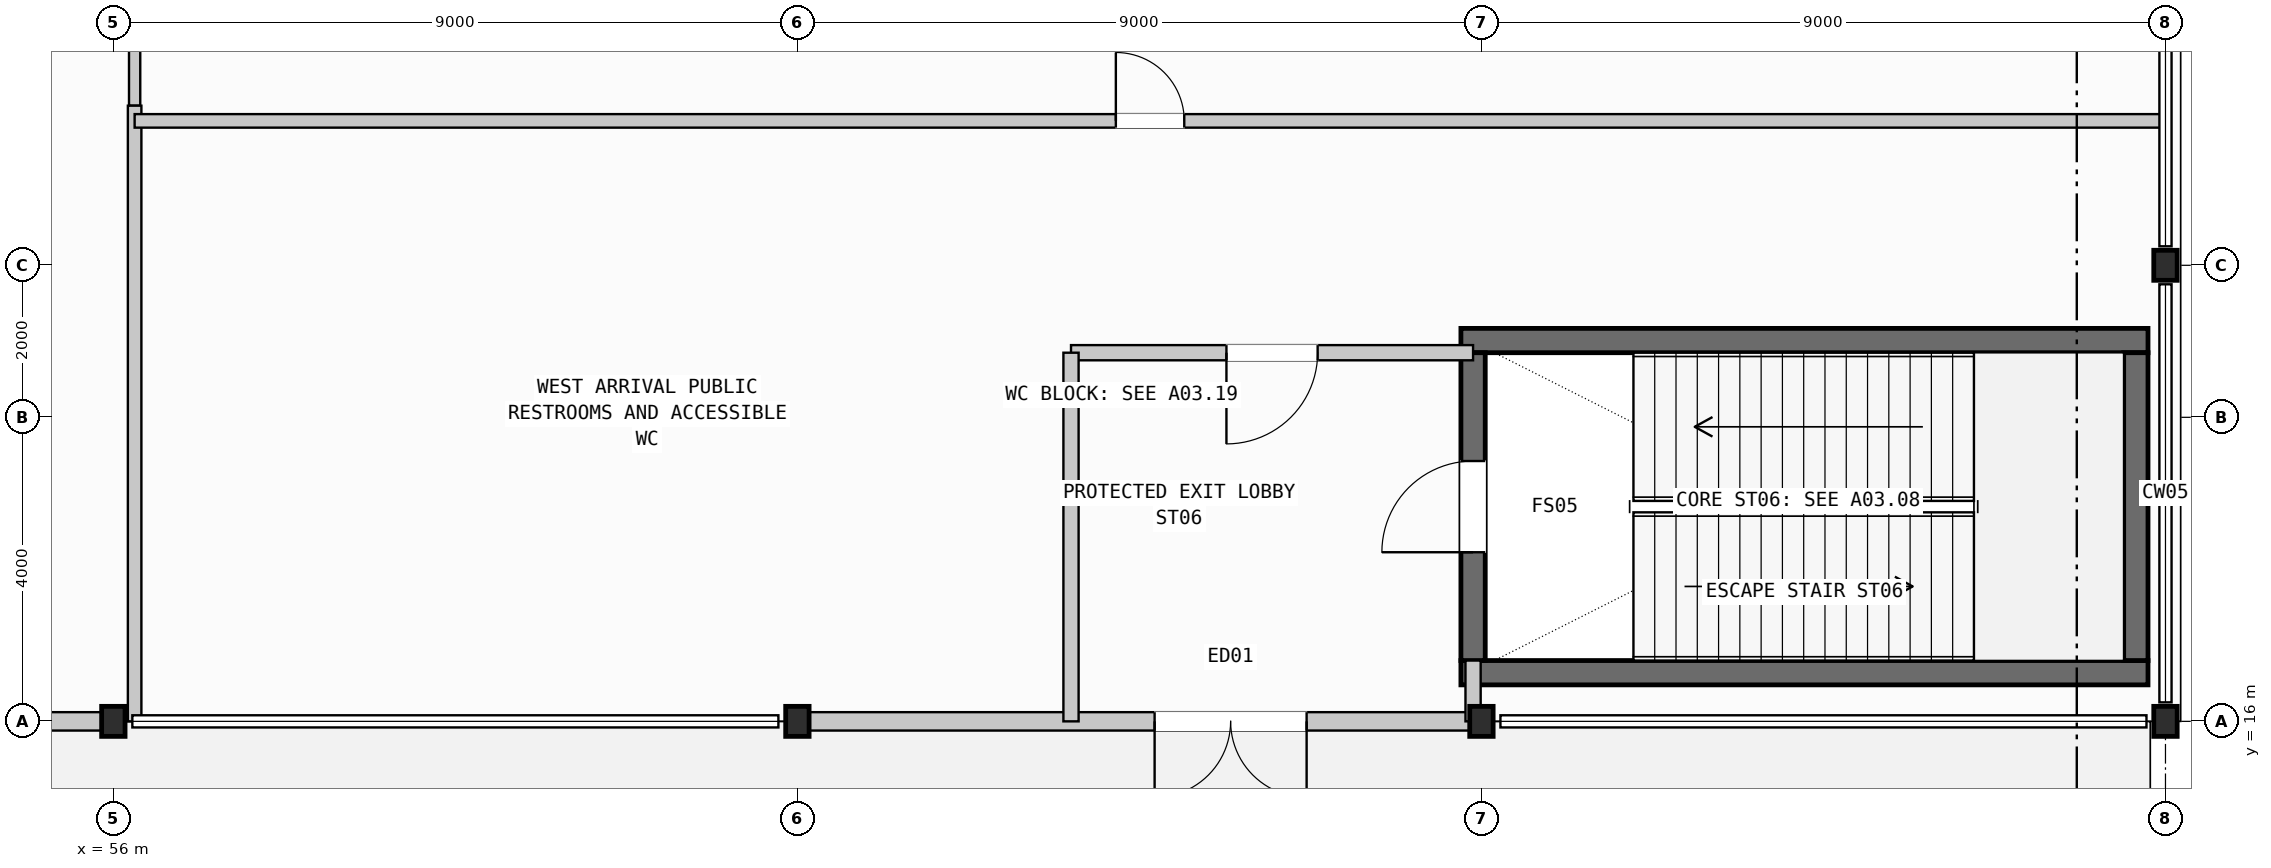
"""IFC4 building model, lengths in metres.
Left out: names, types, materials, properties, quantities, classifications, styles, units other than length and angle.
Written with IfcOpenShell. Run it as: python <this file> out.ifc"""

import sys

from ifc_helpers import new_model, si_unit, direction, frame, frame_2d, origin, origin_2d, place, context, subcontext, project, spatial, rectangle, i_section, extrude, element, fill, save


model = new_model("IFC4")
c1 = context("Model", 3, precision=1e-05, world=origin(), true_north=direction((0.0, 1.0)))
c2 = subcontext(c1, "Body", "Model", "MODEL_VIEW")
j1 = project(units=[si_unit("LENGTHUNIT", "METRE"), si_unit("PLANEANGLEUNIT", "RADIAN")], contexts=[c1])
p1 = place(None, origin())
s1 = spatial("IfcSite", under=j1, at=p1, CompositionType="ELEMENT")
p2 = place(p1, origin())
s2 = spatial("IfcBuilding", under=s1, at=p2, CompositionType="ELEMENT")
p3 = place(p2, origin())
s3 = spatial("IfcBuildingStorey", under=s2, at=p3, CompositionType="ELEMENT", Elevation=0.0)
for number, where, z_axis, x_axis in (
    (1, (56.0, 16.0, 0.0), (0.0, 0.0, 1.0), (1.0, 0.0, 0.0)),
    (2, (65.0, 16.0, 0.0), (0.0, 0.0, 1.0), (1.0, 0.0, 0.0)),
    (3, (74.0, 16.0, 0.0), (0.0, 0.0, 1.0), (1.0, 0.0, 0.0)),
    (4, (83.0, 16.0, 0.0), (0.0, 0.0, 1.0), (1.0, 0.0, 0.0)),
    (5, (83.0, 22.0, 0.0), (0.0, 0.0, 1.0), (1.0, 0.0, 0.0)),
):
    element("IfcColumn", number, at=place(p3, frame(where, z_axis=z_axis, x_axis=x_axis)), inside=s3, PredefinedType="COLUMN", context=c2, shape_type="SweptSolid", body=[
        extrude(i_section(OverallWidth=0.308, OverallDepth=0.395, WebThickness=0.021, FlangeThickness=0.04, FilletRadius=0.027, at=origin_2d()), origin(), (0.0, 0.0, 1.0), 6.0),
    ])
for number, where, z_axis, x_axis in (
    (6, (73.73, 16.64, 0.0), (0.0, 0.0, 1.0), (1.0, 0.0, 0.0)),
    (7, (73.73, 21.01, 0.0), (0.0, 0.0, 1.0), (1.0, 0.0, 0.0)),
):
    element("IfcWall", number, at=place(p3, frame(where, z_axis=z_axis, x_axis=x_axis)), inside=s3, PredefinedType="SHEAR", context=c2, shape_type="SweptSolid", body=[
        extrude(rectangle(XDim=9.04, YDim=0.32, at=frame_2d((4.52, 0.0))), origin(), (0.0, 0.0, 1.0), 6.0),
    ])
p4 = place(p3, frame((73.89, 16.8, 0.0), z_axis=(0.0, 0.0, 1.0), x_axis=(0.0, 1.0, 0.0)))
e8 = element("IfcWall", 8, at=p4, inside=s3, PredefinedType="SHEAR", context=c2, shape_type="SweptSolid", body=[
    extrude(rectangle(XDim=4.05, YDim=0.32, at=frame_2d((2.025, 0.0))), origin(), (0.0, 0.0, 1.0), 6.0),
])
p5 = place(p4, frame((1.425, 0.0, 0.0)))
e9 = element("IfcOpeningElement", 9, at=p5, cuts=e8, PredefinedType="OPENING", context=c2, shape_type="SweptSolid", body=[
    extrude(rectangle(XDim=1.2, YDim=2.2, at=frame_2d((0.6, 1.1))), frame((0.0, 0.17, 0.0), z_axis=(0.0, -1.0, 0.0), x_axis=(1.0, 0.0, 0.0)), (0.0, 0.0, 1.0), 0.34),
])
p6 = place(p3, frame((82.61, 16.8, 0.0), z_axis=(0.0, 0.0, 1.0), x_axis=(0.0, 1.0, 0.0)))
e10 = element("IfcWall", 10, at=p6, inside=s3, PredefinedType="SHEAR", context=c2, shape_type="SweptSolid", body=[
    extrude(rectangle(XDim=4.05, YDim=0.32, at=frame_2d((2.025, 0.0))), origin(), (0.0, 0.0, 1.0), 6.0),
])
p7 = place(p3, frame((47.15, 16.0, 0.0), z_axis=(0.0, 0.0, 1.0), x_axis=(1.0, 0.0, 0.0)))
e11 = element("IfcWall", 11, at=p7, inside=s3, PredefinedType="STANDARD", context=c2, shape_type="SweptSolid", body=[
    extrude(rectangle(XDim=8.7, YDim=0.242, at=frame_2d((4.35, 0.0))), origin(), (0.0, 0.0, 1.0), 5.098),
])
p8 = place(p7, frame((3.19, 0.0, 0.0)))
e12 = element("IfcOpeningElement", 12, at=p8, cuts=e11, PredefinedType="OPENING", context=c2, shape_type="SweptSolid", body=[
    extrude(rectangle(XDim=2.32, YDim=2.44, at=frame_2d((1.16, 1.22))), frame((0.0, 0.131, 0.0), z_axis=(0.0, -1.0, 0.0), x_axis=(1.0, 0.0, 0.0)), (0.0, 0.0, 1.0), 0.262),
])
p9 = place(p3, frame((65.15, 16.0, 0.0), z_axis=(0.0, 0.0, 1.0), x_axis=(1.0, 0.0, 0.0)))
e13 = element("IfcWall", 13, at=p9, inside=s3, PredefinedType="STANDARD", context=c2, shape_type="SweptSolid", body=[
    extrude(rectangle(XDim=8.7, YDim=0.242, at=frame_2d((4.35, 0.0))), origin(), (0.0, 0.0, 1.0), 5.098),
])
p10 = place(p9, frame((4.55, 0.0, 0.0)))
e14 = element("IfcOpeningElement", 14, at=p10, cuts=e13, PredefinedType="OPENING", context=c2, shape_type="SweptSolid", body=[
    extrude(rectangle(XDim=2.0, YDim=2.3, at=frame_2d((1.0, 1.15))), frame((0.0, 0.131, 0.0), z_axis=(0.0, -1.0, 0.0), x_axis=(1.0, 0.0, 0.0)), (0.0, 0.0, 1.0), 0.262),
])
p11 = place(p3, frame((68.6, 20.85, 0.0), z_axis=(0.0, 0.0, 1.0), x_axis=(1.0, 0.0, 0.0)))
e15 = element("IfcWall", 15, at=p11, inside=s3, PredefinedType="PARTITIONING", context=c2, shape_type="SweptSolid", body=[
    extrude(rectangle(XDim=5.29, YDim=0.2, at=frame_2d((2.645, 0.0))), origin(), (0.0, 0.0, 1.0), 4.2),
])
p12 = place(p11, frame((2.045, 0.0, 0.0)))
e16 = element("IfcOpeningElement", 16, at=p12, cuts=e15, PredefinedType="OPENING", context=c2, shape_type="SweptSolid", body=[
    extrude(rectangle(XDim=1.2, YDim=2.2, at=frame_2d((0.6, 1.1))), frame((0.0, 0.11, 0.0), z_axis=(0.0, -1.0, 0.0), x_axis=(1.0, 0.0, 0.0)), (0.0, 0.0, 1.0), 0.22),
])
p13 = place(p3, frame((68.6, 16.0, 0.0), z_axis=(0.0, 0.0, 1.0), x_axis=(0.0, 1.0, 0.0)))
e17 = element("IfcWall", 17, at=p13, inside=s3, PredefinedType="PARTITIONING", context=c2, shape_type="SweptSolid", body=[
    extrude(rectangle(XDim=4.85, YDim=0.2, at=frame_2d((2.425, 0.0))), origin(), (0.0, 0.0, 1.0), 4.2),
])
p14 = place(p3, frame((73.89, 16.0, 0.0), z_axis=(0.0, 0.0, 1.0), x_axis=(0.0, 1.0, 0.0)))
e18 = element("IfcWall", 18, at=p14, inside=s3, PredefinedType="PARTITIONING", context=c2, shape_type="SweptSolid", body=[
    extrude(rectangle(XDim=0.8, YDim=0.2, at=frame_2d((0.4, 0.0))), origin(), (0.0, 0.0, 1.0), 4.2),
])
p15 = place(p3, frame((56.28, 24.1, 0.0), z_axis=(0.0, 0.0, 1.0), x_axis=(0.0, 1.0, 0.0)))
e19 = element("IfcWall", 19, at=p15, inside=s3, PredefinedType="PARTITIONING", context=c2, shape_type="SweptSolid", body=[
    extrude(rectangle(XDim=16.6, YDim=0.148, at=frame_2d((8.3, 0.0))), origin(), (0.0, 0.0, 1.0), 4.9),
])
p16 = place(p15, frame((6.15, 0.0, 0.0)))
e20 = element("IfcOpeningElement", 20, at=p16, cuts=e19, PredefinedType="OPENING", context=c2, shape_type="SweptSolid", body=[
    extrude(rectangle(XDim=2.3, YDim=2.36, at=frame_2d((1.15, 1.18))), frame((0.0, 0.084, 0.0), z_axis=(0.0, -1.0, 0.0), x_axis=(1.0, 0.0, 0.0)), (0.0, 0.0, 1.0), 0.168),
])
p17 = place(p3, frame((56.28, 16.0, 0.0), z_axis=(0.0, 0.0, 1.0), x_axis=(0.0, 1.0, 0.0)))
e21 = element("IfcWall", 21, at=p17, inside=s3, PredefinedType="PARTITIONING", context=c2, shape_type="SweptSolid", body=[
    extrude(rectangle(XDim=8.1, YDim=0.178, at=frame_2d((4.05, 0.0))), origin(), (0.0, 0.0, 1.0), 4.9),
])
p18 = place(p3, frame((56.28, 23.9, 0.0), z_axis=(0.0, 0.0, 1.0), x_axis=(1.0, 0.0, 0.0)))
e22 = element("IfcWall", 22, at=p18, inside=s3, PredefinedType="PARTITIONING", context=c2, shape_type="SweptSolid", body=[
    extrude(rectangle(XDim=26.72, YDim=0.178, at=frame_2d((13.36, 0.0))), origin(), (0.0, 0.0, 1.0), 4.9),
])
p19 = place(p18, frame((12.91, 0.0, 0.0)))
e23 = element("IfcOpeningElement", 23, at=p19, cuts=e22, PredefinedType="OPENING", context=c2, shape_type="SweptSolid", body=[
    extrude(rectangle(XDim=0.9, YDim=2.08, at=frame_2d((0.45, 1.04))), frame((0.0, 0.099, 0.0), z_axis=(0.0, -1.0, 0.0), x_axis=(1.0, 0.0, 0.0)), (0.0, 0.0, 1.0), 0.198),
])
p20 = place(p5, origin())
e24 = element("IfcDoor", 24, at=p20, inside=s3, OperationType="SINGLE_SWING_LEFT", PredefinedType="DOOR", context=c2, shape_type="SweptSolid", body=[
    extrude(rectangle(XDim=1.2, YDim=2.2, at=frame_2d((0.6, 1.1))), frame((0.0, 0.025, 0.0), z_axis=(0.0, -1.0, 0.0), x_axis=(1.0, 0.0, 0.0)), (0.0, 0.0, 1.0), 0.05),
])
fill(e9, e24)
p21 = place(p10, frame((2.0, 0.0, 0.0), z_axis=(0.0, 0.0, 1.0), x_axis=(-1.0, 0.0, 0.0)))
e25 = element("IfcDoor", 25, at=p21, inside=s3, OperationType="DOUBLE_DOOR_SINGLE_SWING", PredefinedType="DOOR", context=c2, shape_type="SweptSolid", body=[
    extrude(rectangle(XDim=2.0, YDim=2.3, at=frame_2d((1.0, 1.15))), frame((0.0, 0.025, 0.0), z_axis=(0.0, -1.0, 0.0), x_axis=(1.0, 0.0, 0.0)), (0.0, 0.0, 1.0), 0.05),
])
fill(e14, e25)
p22 = place(p12, frame((1.2, 0.0, 0.0), z_axis=(0.0, 0.0, 1.0), x_axis=(-1.0, 0.0, 0.0)))
e26 = element("IfcDoor", 26, at=p22, inside=s3, OperationType="SINGLE_SWING_RIGHT", PredefinedType="DOOR", context=c2, shape_type="SweptSolid", body=[
    extrude(rectangle(XDim=1.2, YDim=2.2, at=frame_2d((0.6, 1.1))), frame((0.0, 0.025, 0.0), z_axis=(0.0, -1.0, 0.0), x_axis=(1.0, 0.0, 0.0)), (0.0, 0.0, 1.0), 0.05),
])
fill(e16, e26)
p23 = place(p19, origin())
e27 = element("IfcDoor", 27, at=p23, inside=s3, OperationType="SINGLE_SWING_LEFT", PredefinedType="DOOR", context=c2, shape_type="SweptSolid", body=[
    extrude(rectangle(XDim=0.9, YDim=2.08, at=frame_2d((0.45, 1.04))), frame((0.0, 0.025, 0.0), z_axis=(0.0, -1.0, 0.0), x_axis=(1.0, 0.0, 0.0)), (0.0, 0.0, 1.0), 0.05),
])
fill(e23, e27)
save(model, sys.argv[1])
